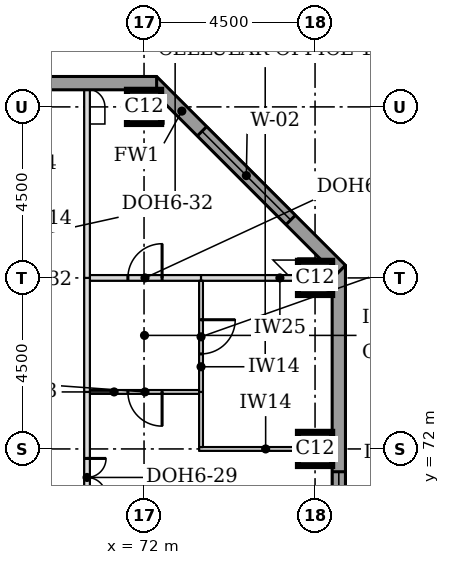
"""IFC4 building model, lengths in metres.
Left out: names, types, materials, properties, quantities, classifications, styles, units other than length and angle.
Written with IfcOpenShell. Run it as: python <this file> out.ifc"""

import sys

from ifc_helpers import new_model, si_unit, direction, frame, frame_2d, origin, origin_2d, place, context, subcontext, project, spatial, rectangle, extrude, element, fill, save


model = new_model("IFC4")
c1 = context("Model", 3, precision=1e-05, world=origin(), true_north=direction((0.0, 1.0)))
c2 = subcontext(c1, "Body", "Model", "MODEL_VIEW")
j1 = project(units=[si_unit("LENGTHUNIT", "METRE"), si_unit("PLANEANGLEUNIT", "RADIAN")], contexts=[c1])
p1 = place(None, origin())
s1 = spatial("IfcSite", under=j1, at=p1, CompositionType="ELEMENT")
p2 = place(p1, origin())
s2 = spatial("IfcBuilding", under=s1, at=p2, CompositionType="ELEMENT")
p3 = place(p2, frame((0.0, 0.0, 184.7)))
s3 = spatial("IfcBuildingStorey", under=s2, at=p3, CompositionType="ELEMENT", Elevation=184.7)
for number, where, z_axis, x_axis in (
    (1, (76.5, 72.0, 0.0), (0.0, 0.0, 1.0), (1.0, 0.0, 0.0)),
    (2, (76.5, 76.5, 0.0), (0.0, 0.0, 1.0), (1.0, 0.0, 0.0)),
    (3, (72.0, 81.0, 0.0), (0.0, 0.0, 1.0), (1.0, 0.0, 0.0)),
):
    element("IfcColumn", number, at=place(p3, frame(where, z_axis=z_axis, x_axis=x_axis)), inside=s3, PredefinedType="COLUMN", context=c2, shape_type="SweptSolid", body=[
        extrude(rectangle(XDim=0.9, YDim=0.9, at=origin_2d()), origin(), (0.0, 0.0, 1.0), 3.7),
    ])
p4 = place(p3, frame((77.125, 44.669, 0.0), z_axis=(0.0, 0.0, 1.0), x_axis=(0.0, 1.0, 0.0)))
e4 = element("IfcWall", 4, at=p4, inside=s3, PredefinedType="STANDARD", context=c2, shape_type="SweptSolid", body=[
    extrude(rectangle(XDim=32.163, YDim=0.35, at=frame_2d((16.081, 0.0))), origin(), (0.0, 0.0, 1.0), 3.525),
])
p5 = place(p4, frame((5.431, 0.0, 0.9)))
e5 = element("IfcOpeningElement", 5, at=p5, cuts=e4, PredefinedType="OPENING", context=c2, shape_type="SweptSolid", body=[
    extrude(rectangle(XDim=3.3, YDim=1.9, at=frame_2d((1.65, 0.95))), frame((0.0, 0.185, 0.0), z_axis=(0.0, -1.0, 0.0), x_axis=(1.0, 0.0, 0.0)), (0.0, 0.0, 1.0), 0.37),
])
p6 = place(p4, frame((9.931, 0.0, 0.9)))
e6 = element("IfcOpeningElement", 6, at=p6, cuts=e4, PredefinedType="OPENING", context=c2, shape_type="SweptSolid", body=[
    extrude(rectangle(XDim=3.3, YDim=1.9, at=frame_2d((1.65, 0.95))), frame((0.0, 0.185, 0.0), z_axis=(0.0, -1.0, 0.0), x_axis=(1.0, 0.0, 0.0)), (0.0, 0.0, 1.0), 0.37),
])
p7 = place(p4, frame((14.431, 0.0, 0.9)))
e7 = element("IfcOpeningElement", 7, at=p7, cuts=e4, PredefinedType="OPENING", context=c2, shape_type="SweptSolid", body=[
    extrude(rectangle(XDim=3.3, YDim=1.9, at=frame_2d((1.65, 0.95))), frame((0.0, 0.185, 0.0), z_axis=(0.0, -1.0, 0.0), x_axis=(1.0, 0.0, 0.0)), (0.0, 0.0, 1.0), 0.37),
])
p8 = place(p4, frame((18.931, 0.0, 0.9)))
e8 = element("IfcOpeningElement", 8, at=p8, cuts=e4, PredefinedType="OPENING", context=c2, shape_type="SweptSolid", body=[
    extrude(rectangle(XDim=3.3, YDim=1.9, at=frame_2d((1.65, 0.95))), frame((0.0, 0.185, 0.0), z_axis=(0.0, -1.0, 0.0), x_axis=(1.0, 0.0, 0.0)), (0.0, 0.0, 1.0), 0.37),
])
p9 = place(p4, frame((23.431, 0.0, 0.9)))
e9 = element("IfcOpeningElement", 9, at=p9, cuts=e4, PredefinedType="OPENING", context=c2, shape_type="SweptSolid", body=[
    extrude(rectangle(XDim=3.3, YDim=1.9, at=frame_2d((1.65, 0.95))), frame((0.0, 0.185, 0.0), z_axis=(0.0, -1.0, 0.0), x_axis=(1.0, 0.0, 0.0)), (0.0, 0.0, 1.0), 0.37),
])
p10 = place(p3, frame((77.176, 76.708, 0.0), z_axis=(0.0, 0.0, 1.0), x_axis=(-0.707106781187, 0.707106781187, 0.0)))
e10 = element("IfcWall", 10, at=p10, inside=s3, PredefinedType="STANDARD", context=c2, shape_type="SweptSolid", body=[
    extrude(rectangle(XDim=7.027, YDim=0.35, at=frame_2d((3.513, 0.0))), origin(), (0.0, 0.0, 1.0), 3.525),
])
p11 = place(p10, frame((1.863, 0.0, 0.9)))
e11 = element("IfcOpeningElement", 11, at=p11, cuts=e10, PredefinedType="OPENING", context=c2, shape_type="SweptSolid", body=[
    extrude(rectangle(XDim=3.3, YDim=1.9, at=frame_2d((1.65, 0.95))), frame((0.0, 0.185, 0.0), z_axis=(0.0, -1.0, 0.0), x_axis=(1.0, 0.0, 0.0)), (0.0, 0.0, 1.0), 0.37),
])
p12 = place(p3, frame((72.331, 81.625, 0.0), z_axis=(0.0, 0.0, 1.0), x_axis=(-1.0, 0.0, 0.0)))
e12 = element("IfcWall", 12, at=p12, inside=s3, PredefinedType="STANDARD", context=c2, shape_type="SweptSolid", body=[
    extrude(rectangle(XDim=32.163, YDim=0.35, at=frame_2d((16.081, 0.0))), origin(), (0.0, 0.0, 1.0), 3.525),
])
p13 = place(p12, frame((5.431, 0.0, 0.9)))
e13 = element("IfcOpeningElement", 13, at=p13, cuts=e12, PredefinedType="OPENING", context=c2, shape_type="SweptSolid", body=[
    extrude(rectangle(XDim=3.3, YDim=1.9, at=frame_2d((1.65, 0.95))), frame((0.0, 0.185, 0.0), z_axis=(0.0, -1.0, 0.0), x_axis=(1.0, 0.0, 0.0)), (0.0, 0.0, 1.0), 0.37),
])
p14 = place(p12, frame((9.931, 0.0, 0.9)))
e14 = element("IfcOpeningElement", 14, at=p14, cuts=e12, PredefinedType="OPENING", context=c2, shape_type="SweptSolid", body=[
    extrude(rectangle(XDim=3.3, YDim=1.9, at=frame_2d((1.65, 0.95))), frame((0.0, 0.185, 0.0), z_axis=(0.0, -1.0, 0.0), x_axis=(1.0, 0.0, 0.0)), (0.0, 0.0, 1.0), 0.37),
])
p15 = place(p12, frame((14.431, 0.0, 0.9)))
e15 = element("IfcOpeningElement", 15, at=p15, cuts=e12, PredefinedType="OPENING", context=c2, shape_type="SweptSolid", body=[
    extrude(rectangle(XDim=3.3, YDim=1.9, at=frame_2d((1.65, 0.95))), frame((0.0, 0.185, 0.0), z_axis=(0.0, -1.0, 0.0), x_axis=(1.0, 0.0, 0.0)), (0.0, 0.0, 1.0), 0.37),
])
p16 = place(p12, frame((18.931, 0.0, 0.9)))
e16 = element("IfcOpeningElement", 16, at=p16, cuts=e12, PredefinedType="OPENING", context=c2, shape_type="SweptSolid", body=[
    extrude(rectangle(XDim=3.3, YDim=1.9, at=frame_2d((1.65, 0.95))), frame((0.0, 0.185, 0.0), z_axis=(0.0, -1.0, 0.0), x_axis=(1.0, 0.0, 0.0)), (0.0, 0.0, 1.0), 0.37),
])
p17 = place(p12, frame((23.431, 0.0, 0.9)))
e17 = element("IfcOpeningElement", 17, at=p17, cuts=e12, PredefinedType="OPENING", context=c2, shape_type="SweptSolid", body=[
    extrude(rectangle(XDim=3.3, YDim=1.9, at=frame_2d((1.65, 0.95))), frame((0.0, 0.185, 0.0), z_axis=(0.0, -1.0, 0.0), x_axis=(1.0, 0.0, 0.0)), (0.0, 0.0, 1.0), 0.37),
])
p18 = place(p3, frame((73.45, 72.0, 0.0), z_axis=(0.0, 0.0, 1.0), x_axis=(1.0, 0.0, 0.0)))
e18 = element("IfcWall", 18, at=p18, inside=s3, PredefinedType="PARTITIONING", context=c2, shape_type="SweptSolid", body=[
    extrude(rectangle(XDim=3.5, YDim=0.1, at=frame_2d((1.75, 0.0))), origin(), (0.0, 0.0, 1.0), 3.55),
])
p19 = place(p3, frame((70.575, 73.5, 0.0), z_axis=(0.0, 0.0, 1.0), x_axis=(1.0, 0.0, 0.0)))
e19 = element("IfcWall", 19, at=p19, inside=s3, PredefinedType="PARTITIONING", context=c2, shape_type="SweptSolid", body=[
    extrude(rectangle(XDim=2.875, YDim=0.1, at=frame_2d((1.438, 0.0))), origin(), (0.0, 0.0, 1.0), 3.096),
])
p20 = place(p19, frame((1.0, 0.0, 0.0)))
e20 = element("IfcOpeningElement", 20, at=p20, cuts=e19, PredefinedType="OPENING", context=c2, shape_type="SweptSolid", body=[
    extrude(rectangle(XDim=0.9, YDim=2.1, at=frame_2d((0.45, 1.05))), frame((0.0, 0.06, 0.0), z_axis=(0.0, -1.0, 0.0), x_axis=(1.0, 0.0, 0.0)), (0.0, 0.0, 1.0), 0.12),
])
p21 = place(p3, frame((70.575, 76.5, 0.0), z_axis=(0.0, 0.0, 1.0), x_axis=(1.0, 0.0, 0.0)))
e21 = element("IfcWall", 21, at=p21, inside=s3, PredefinedType="PARTITIONING", context=c2, shape_type="SweptSolid", body=[
    extrude(rectangle(XDim=2.925, YDim=0.15, at=frame_2d((1.462, 0.0))), origin(), (0.0, 0.0, 1.0), 3.096),
])
p22 = place(p21, frame((1.0, 0.0, 0.0)))
e22 = element("IfcOpeningElement", 22, at=p22, cuts=e21, PredefinedType="OPENING", context=c2, shape_type="SweptSolid", body=[
    extrude(rectangle(XDim=0.9, YDim=2.1, at=frame_2d((0.45, 1.05))), frame((0.0, 0.085, 0.0), z_axis=(0.0, -1.0, 0.0), x_axis=(1.0, 0.0, 0.0)), (0.0, 0.0, 1.0), 0.17),
])
p23 = place(p3, frame((73.5, 76.5, 0.0), z_axis=(0.0, 0.0, 1.0), x_axis=(1.0, 0.0, 0.0)))
e23 = element("IfcWall", 23, at=p23, inside=s3, PredefinedType="PARTITIONING", context=c2, shape_type="SweptSolid", body=[
    extrude(rectangle(XDim=2.55, YDim=0.15, at=frame_2d((1.275, 0.0))), origin(), (0.0, 0.0, 1.0), 3.096),
])
p24 = place(p3, frame((70.5, 69.0, 0.0), z_axis=(0.0, 0.0, 1.0), x_axis=(0.0, 1.0, 0.0)))
e24 = element("IfcWall", 24, at=p24, inside=s3, PredefinedType="PARTITIONING", context=c2, shape_type="SweptSolid", body=[
    extrude(rectangle(XDim=4.5, YDim=0.15, at=frame_2d((2.25, 0.0))), origin(), (0.0, 0.0, 1.0), 3.55),
])
p25 = place(p24, frame((1.75, 0.0, 0.0)))
e25 = element("IfcOpeningElement", 25, at=p25, cuts=e24, PredefinedType="OPENING", context=c2, shape_type="SweptSolid", body=[
    extrude(rectangle(XDim=1.0, YDim=2.1, at=frame_2d((0.5, 1.05))), frame((0.0, 0.085, 0.0), z_axis=(0.0, -1.0, 0.0), x_axis=(1.0, 0.0, 0.0)), (0.0, 0.0, 1.0), 0.17),
])
p26 = place(p3, frame((73.5, 72.05, 0.0), z_axis=(0.0, 0.0, 1.0), x_axis=(0.0, 1.0, 0.0)))
e26 = element("IfcWall", 26, at=p26, inside=s3, PredefinedType="PARTITIONING", context=c2, shape_type="SweptSolid", body=[
    extrude(rectangle(XDim=1.45, YDim=0.1, at=frame_2d((0.725, 0.0))), origin(), (0.0, 0.0, 1.0), 3.55),
])
p27 = place(p3, frame((70.5, 73.5, 0.0), z_axis=(0.0, 0.0, 1.0), x_axis=(0.0, 1.0, 0.0)))
e27 = element("IfcWall", 27, at=p27, inside=s3, PredefinedType="PARTITIONING", context=c2, shape_type="SweptSolid", body=[
    extrude(rectangle(XDim=3.0, YDim=0.15, at=frame_2d((1.5, 0.0))), origin(), (0.0, 0.0, 1.0), 3.55),
])
p28 = place(p3, frame((73.5, 73.5, 0.0), z_axis=(0.0, 0.0, 1.0), x_axis=(0.0, 1.0, 0.0)))
e28 = element("IfcWall", 28, at=p28, inside=s3, PredefinedType="PARTITIONING", context=c2, shape_type="SweptSolid", body=[
    extrude(rectangle(XDim=2.925, YDim=0.1, at=frame_2d((1.462, 0.0))), origin(), (0.0, 0.0, 1.0), 3.55),
])
p29 = place(p28, frame((1.0, 0.0, 0.0)))
e29 = element("IfcOpeningElement", 29, at=p29, cuts=e28, PredefinedType="OPENING", context=c2, shape_type="SweptSolid", body=[
    extrude(rectangle(XDim=0.9, YDim=2.1, at=frame_2d((0.45, 1.05))), frame((0.0, 0.06, 0.0), z_axis=(0.0, -1.0, 0.0), x_axis=(1.0, 0.0, 0.0)), (0.0, 0.0, 1.0), 0.12),
])
p30 = place(p3, frame((70.5, 76.5, 0.0), z_axis=(0.0, 0.0, 1.0), x_axis=(0.0, 1.0, 0.0)))
e30 = element("IfcWall", 30, at=p30, inside=s3, PredefinedType="PARTITIONING", context=c2, shape_type="SweptSolid", body=[
    extrude(rectangle(XDim=4.95, YDim=0.15, at=frame_2d((2.475, 0.0))), origin(), (0.0, 0.0, 1.0), 3.55),
])
p31 = place(p9, origin())
e31 = element("IfcWindow", 31, at=p31, inside=s3, PartitioningType="SINGLE_PANEL", PredefinedType="WINDOW", context=c2, shape_type="SweptSolid", body=[
    extrude(rectangle(XDim=3.3, YDim=1.9, at=frame_2d((1.65, 0.95))), frame((0.0, 0.085, 0.0), z_axis=(0.0, -1.0, 0.0), x_axis=(1.0, 0.0, 0.0)), (0.0, 0.0, 1.0), 0.06),
])
fill(e9, e31)
p32 = place(p11, origin())
e32 = element("IfcWindow", 32, at=p32, inside=s3, PartitioningType="SINGLE_PANEL", PredefinedType="WINDOW", context=c2, shape_type="SweptSolid", body=[
    extrude(rectangle(XDim=3.3, YDim=1.9, at=frame_2d((1.65, 0.95))), frame((0.0, 0.085, 0.0), z_axis=(0.0, -1.0, 0.0), x_axis=(1.0, 0.0, 0.0)), (0.0, 0.0, 1.0), 0.06),
])
fill(e11, e32)
p33 = place(p25, frame((1.0, 0.0, 0.0), z_axis=(0.0, 0.0, 1.0), x_axis=(-1.0, 0.0, 0.0)))
e33 = element("IfcDoor", 33, at=p33, inside=s3, OperationType="DOUBLE_DOOR_SINGLE_SWING", PredefinedType="DOOR", context=c2, shape_type="SweptSolid", body=[
    extrude(rectangle(XDim=1.0, YDim=2.1, at=frame_2d((0.5, 1.05))), frame((0.0, 0.025, 0.0), z_axis=(0.0, -1.0, 0.0), x_axis=(1.0, 0.0, 0.0)), (0.0, 0.0, 1.0), 0.05),
])
fill(e25, e33)
p34 = place(p20, frame((0.9, 0.0, 0.0), z_axis=(0.0, 0.0, 1.0), x_axis=(-1.0, 0.0, 0.0)))
e34 = element("IfcDoor", 34, at=p34, inside=s3, OperationType="SINGLE_SWING_LEFT", PredefinedType="DOOR", context=c2, shape_type="SweptSolid", body=[
    extrude(rectangle(XDim=0.9, YDim=2.1, at=frame_2d((0.45, 1.05))), frame((0.0, 0.025, 0.0), z_axis=(0.0, -1.0, 0.0), x_axis=(1.0, 0.0, 0.0)), (0.0, 0.0, 1.0), 0.05),
])
fill(e20, e34)
p35 = place(p29, frame((0.9, 0.0, 0.0), z_axis=(0.0, 0.0, 1.0), x_axis=(-1.0, 0.0, 0.0)))
e35 = element("IfcDoor", 35, at=p35, inside=s3, OperationType="SINGLE_SWING_LEFT", PredefinedType="DOOR", context=c2, shape_type="SweptSolid", body=[
    extrude(rectangle(XDim=0.9, YDim=2.1, at=frame_2d((0.45, 1.05))), frame((0.0, 0.025, 0.0), z_axis=(0.0, -1.0, 0.0), x_axis=(1.0, 0.0, 0.0)), (0.0, 0.0, 1.0), 0.05),
])
fill(e29, e35)
p36 = place(p22, origin())
e36 = element("IfcDoor", 36, at=p36, inside=s3, OperationType="SINGLE_SWING_RIGHT", PredefinedType="DOOR", context=c2, shape_type="SweptSolid", body=[
    extrude(rectangle(XDim=0.9, YDim=2.1, at=frame_2d((0.45, 1.05))), frame((0.0, 0.025, 0.0), z_axis=(0.0, -1.0, 0.0), x_axis=(1.0, 0.0, 0.0)), (0.0, 0.0, 1.0), 0.05),
])
fill(e22, e36)
save(model, sys.argv[1])
